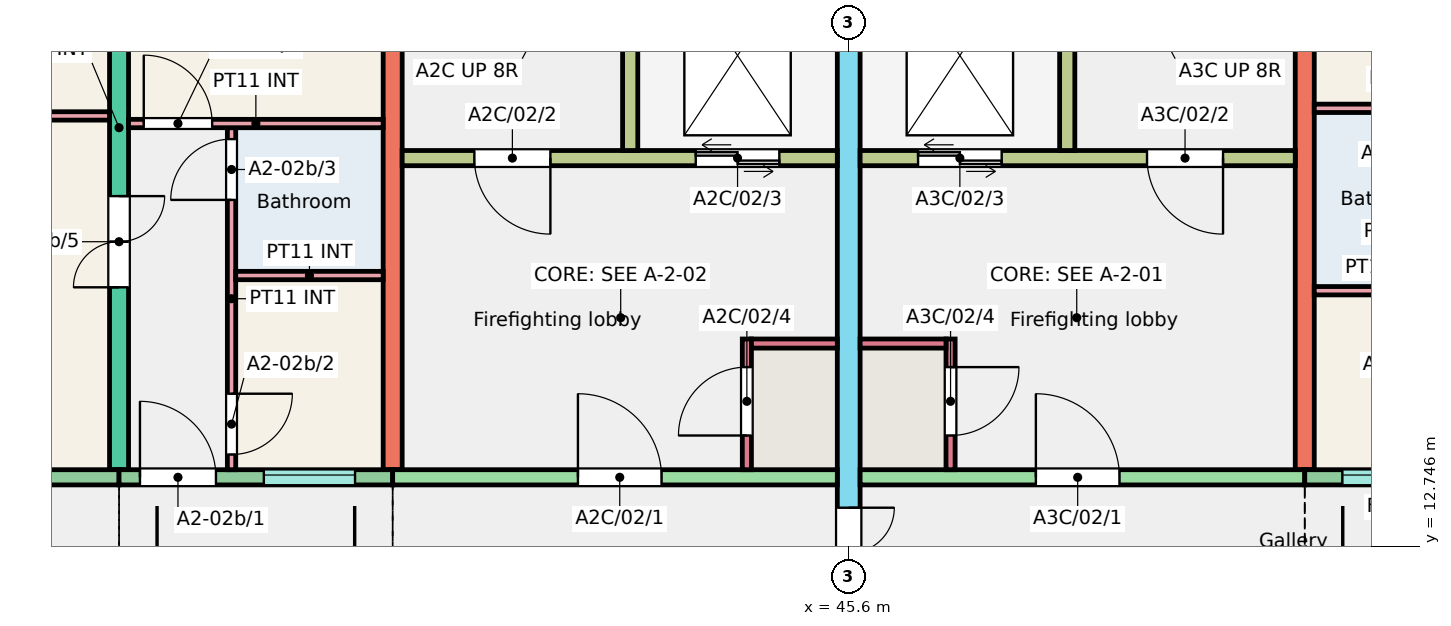
"""IFC4 building model, lengths in metres.
Left out: names, types, materials, properties, quantities, classifications, styles, units other than length and angle.
Written with IfcOpenShell. Run it as: python <this file> out.ifc"""

import sys

from ifc_helpers import new_model, si_unit, direction, frame, frame_2d, origin, place, context, subcontext, project, spatial, rectangle, extrude, element, fill, save


model = new_model("IFC4")
c1 = context("Model", 3, precision=1e-05, world=origin(), true_north=direction((0.0, 1.0)))
c2 = subcontext(c1, "Body", "Model", "MODEL_VIEW")
j1 = project(units=[si_unit("LENGTHUNIT", "METRE"), si_unit("PLANEANGLEUNIT", "RADIAN")], contexts=[c1])
p1 = place(None, origin())
s1 = spatial("IfcSite", under=j1, at=p1, CompositionType="ELEMENT")
p2 = place(p1, origin())
s2 = spatial("IfcBuilding", under=s1, at=p2, CompositionType="ELEMENT")
p3 = place(p2, frame((0.0, 0.0, 6.0)))
s3 = spatial("IfcBuildingStorey", under=s2, at=p3, CompositionType="ELEMENT", Elevation=6.0)
p4 = place(p3, frame((36.0, 13.75, 0.0), z_axis=(0.0, 0.0, 1.0), x_axis=(0.0, 1.0, 0.0)))
e1 = element("IfcWall", 1, at=p4, inside=s3, PredefinedType="SHEAR", context=c2, shape_type="SweptSolid", body=[
    extrude(rectangle(XDim=9.0, YDim=0.25, at=frame_2d((4.5, 0.0))), origin(), (0.0, 0.0, 1.0), 3.0),
])
p5 = place(p4, frame((2.4, 0.0, 0.0)))
e2 = element("IfcOpeningElement", 2, at=p5, cuts=e1, PredefinedType="OPENING", context=c2, shape_type="SweptSolid", body=[
    extrude(rectangle(XDim=1.2, YDim=2.1, at=frame_2d((0.6, 1.05))), frame((0.0, 0.135, 0.0), z_axis=(0.0, -1.0, 0.0), x_axis=(1.0, 0.0, 0.0)), (0.0, 0.0, 1.0), 0.27),
])
p6 = place(p4, frame((6.4, 0.0, 0.0)))
e3 = element("IfcOpeningElement", 3, at=p6, cuts=e1, PredefinedType="OPENING", context=c2, shape_type="SweptSolid", body=[
    extrude(rectangle(XDim=1.2, YDim=2.1, at=frame_2d((0.6, 1.05))), frame((0.0, 0.135, 0.0), z_axis=(0.0, -1.0, 0.0), x_axis=(1.0, 0.0, 0.0)), (0.0, 0.0, 1.0), 0.27),
])
p7 = place(p3, frame((39.6, 13.75, 0.0), z_axis=(0.0, 0.0, 1.0), x_axis=(0.0, 1.0, 0.0)))
e4 = element("IfcWall", 4, at=p7, inside=s3, PredefinedType="SHEAR", context=c2, shape_type="SweptSolid", body=[
    extrude(rectangle(XDim=9.0, YDim=0.25, at=frame_2d((4.5, 0.0))), origin(), (0.0, 0.0, 1.0), 3.0),
])
p8 = place(p3, frame((45.6, 11.75, 0.0), z_axis=(0.0, 0.0, 1.0), x_axis=(0.0, 1.0, 0.0)))
e5 = element("IfcWall", 5, at=p8, inside=s3, PredefinedType="SHEAR", context=c2, shape_type="SweptSolid", body=[
    extrude(rectangle(XDim=11.0, YDim=0.3, at=frame_2d((5.5, 0.0))), origin(), (0.0, 0.0, 1.0), 3.0),
])
p9 = place(p8, frame((0.3, 0.0, 0.0)))
e6 = element("IfcOpeningElement", 6, at=p9, cuts=e5, PredefinedType="OPENING", context=c2, shape_type="SweptSolid", body=[
    extrude(rectangle(XDim=1.2, YDim=2.1, at=frame_2d((0.6, 1.05))), frame((0.0, 0.16, 0.0), z_axis=(0.0, -1.0, 0.0), x_axis=(1.0, 0.0, 0.0)), (0.0, 0.0, 1.0), 0.32),
])
p10 = place(p3, frame((51.6, 13.75, 0.0), z_axis=(0.0, 0.0, 1.0), x_axis=(0.0, 1.0, 0.0)))
e7 = element("IfcWall", 7, at=p10, inside=s3, PredefinedType="SHEAR", context=c2, shape_type="SweptSolid", body=[
    extrude(rectangle(XDim=9.0, YDim=0.25, at=frame_2d((4.5, 0.0))), origin(), (0.0, 0.0, 1.0), 3.0),
])
p11 = place(p3, frame((32.4, 13.65, 0.0), z_axis=(0.0, 0.0, 1.0), x_axis=(1.0, 0.0, 0.0)))
e8 = element("IfcWall", 8, at=p11, inside=s3, PredefinedType="SOLIDWALL", context=c2, shape_type="SweptSolid", body=[
    extrude(rectangle(XDim=3.6, YDim=0.2, at=frame_2d((1.8, 0.0))), origin(), (0.0, 0.0, 1.0), 3.0),
])
p12 = place(p11, frame((1.2, 0.0, 0.8)))
e9 = element("IfcOpeningElement", 9, at=p12, cuts=e8, PredefinedType="OPENING", context=c2, shape_type="SweptSolid", body=[
    extrude(rectangle(XDim=1.2, YDim=1.6, at=frame_2d((0.6, 0.8))), frame((0.0, 0.11, 0.0), z_axis=(0.0, -1.0, 0.0), x_axis=(1.0, 0.0, 0.0)), (0.0, 0.0, 1.0), 0.22),
])
p13 = place(p3, frame((36.0, 13.65, 0.0), z_axis=(0.0, 0.0, 1.0), x_axis=(1.0, 0.0, 0.0)))
e10 = element("IfcWall", 10, at=p13, inside=s3, PredefinedType="SOLIDWALL", context=c2, shape_type="SweptSolid", body=[
    extrude(rectangle(XDim=3.6, YDim=0.2, at=frame_2d((1.8, 0.0))), origin(), (0.0, 0.0, 1.0), 3.0),
])
p14 = place(p13, frame((1.905, 0.0, 1.1)))
e11 = element("IfcOpeningElement", 11, at=p14, cuts=e10, PredefinedType="OPENING", context=c2, shape_type="SweptSolid", body=[
    extrude(rectangle(XDim=1.2, YDim=1.3, at=frame_2d((0.6, 0.65))), frame((0.0, 0.11, 0.0), z_axis=(0.0, -1.0, 0.0), x_axis=(1.0, 0.0, 0.0)), (0.0, 0.0, 1.0), 0.22),
])
p15 = place(p13, frame((0.275, 0.0, 0.0)))
e12 = element("IfcOpeningElement", 12, at=p15, cuts=e10, PredefinedType="OPENING", context=c2, shape_type="SweptSolid", body=[
    extrude(rectangle(XDim=1.0, YDim=2.1, at=frame_2d((0.5, 1.05))), frame((0.0, 0.11, 0.0), z_axis=(0.0, -1.0, 0.0), x_axis=(1.0, 0.0, 0.0)), (0.0, 0.0, 1.0), 0.22),
])
p16 = place(p3, frame((39.6, 13.65, 0.0), z_axis=(0.0, 0.0, 1.0), x_axis=(1.0, 0.0, 0.0)))
e13 = element("IfcWall", 13, at=p16, inside=s3, PredefinedType="SHEAR", context=c2, shape_type="SweptSolid", body=[
    extrude(rectangle(XDim=5.85, YDim=0.2, at=frame_2d((2.925, 0.0))), origin(), (0.0, 0.0, 1.0), 3.0),
])
p17 = place(p16, frame((2.438, 0.0, 0.0)))
e14 = element("IfcOpeningElement", 14, at=p17, cuts=e13, PredefinedType="OPENING", context=c2, shape_type="SweptSolid", body=[
    extrude(rectangle(XDim=1.1, YDim=2.1, at=frame_2d((0.55, 1.05))), frame((0.0, 0.11, 0.0), z_axis=(0.0, -1.0, 0.0), x_axis=(1.0, 0.0, 0.0)), (0.0, 0.0, 1.0), 0.22),
])
p18 = place(p3, frame((39.725, 17.85, 0.0), z_axis=(0.0, 0.0, 1.0), x_axis=(1.0, 0.0, 0.0)))
e15 = element("IfcWall", 15, at=p18, inside=s3, PredefinedType="SHEAR", context=c2, shape_type="SweptSolid", body=[
    extrude(rectangle(XDim=5.725, YDim=0.2, at=frame_2d((2.862, 0.0))), origin(), (0.0, 0.0, 1.0), 3.0),
])
p19 = place(p18, frame((0.95, 0.0, 0.0)))
e16 = element("IfcOpeningElement", 16, at=p19, cuts=e15, PredefinedType="OPENING", context=c2, shape_type="SweptSolid", body=[
    extrude(rectangle(XDim=1.0, YDim=2.1, at=frame_2d((0.5, 1.05))), frame((0.0, 0.11, 0.0), z_axis=(0.0, -1.0, 0.0), x_axis=(1.0, 0.0, 0.0)), (0.0, 0.0, 1.0), 0.22),
])
p20 = place(p18, frame((3.863, 0.0, 0.0)))
e17 = element("IfcOpeningElement", 17, at=p20, cuts=e15, PredefinedType="OPENING", context=c2, shape_type="SweptSolid", body=[
    extrude(rectangle(XDim=1.1, YDim=2.1, at=frame_2d((0.55, 1.05))), frame((0.0, 0.11, 0.0), z_axis=(0.0, -1.0, 0.0), x_axis=(1.0, 0.0, 0.0)), (0.0, 0.0, 1.0), 0.22),
])
p21 = place(p3, frame((42.725, 17.95, 0.0), z_axis=(0.0, 0.0, 1.0), x_axis=(0.0, 1.0, 0.0)))
e18 = element("IfcWall", 18, at=p21, inside=s3, PredefinedType="SHEAR", context=c2, shape_type="SweptSolid", body=[
    extrude(rectangle(XDim=4.8, YDim=0.2, at=frame_2d((2.4, 0.0))), origin(), (0.0, 0.0, 1.0), 3.0),
])
p22 = place(p3, frame((44.26, 13.75, 0.0), z_axis=(0.0, 0.0, 1.0), x_axis=(0.0, 1.0, 0.0)))
e19 = element("IfcWall", 19, at=p22, inside=s3, PredefinedType="SHEAR", context=c2, shape_type="SweptSolid", body=[
    extrude(rectangle(XDim=1.72, YDim=0.12, at=frame_2d((0.86, 0.0))), origin(), (0.0, 0.0, 1.0), 3.0),
])
p23 = place(p22, frame((0.45, 0.0, 0.0)))
e20 = element("IfcOpeningElement", 20, at=p23, cuts=e19, PredefinedType="OPENING", context=c2, shape_type="SweptSolid", body=[
    extrude(rectangle(XDim=0.9, YDim=2.1, at=frame_2d((0.45, 1.05))), frame((0.0, 0.07, 0.0), z_axis=(0.0, -1.0, 0.0), x_axis=(1.0, 0.0, 0.0)), (0.0, 0.0, 1.0), 0.14),
])
p24 = place(p3, frame((44.32, 15.41, 0.0), z_axis=(0.0, 0.0, 1.0), x_axis=(1.0, 0.0, 0.0)))
e21 = element("IfcWall", 21, at=p24, inside=s3, PredefinedType="SHEAR", context=c2, shape_type="SweptSolid", body=[
    extrude(rectangle(XDim=1.13, YDim=0.12, at=frame_2d((0.565, 0.0))), origin(), (0.0, 0.0, 1.0), 3.0),
])
p25 = place(p3, frame((45.75, 13.65, 0.0), z_axis=(0.0, 0.0, 1.0), x_axis=(1.0, 0.0, 0.0)))
e22 = element("IfcWall", 22, at=p25, inside=s3, PredefinedType="SHEAR", context=c2, shape_type="SweptSolid", body=[
    extrude(rectangle(XDim=5.85, YDim=0.2, at=frame_2d((2.925, 0.0))), origin(), (0.0, 0.0, 1.0), 3.0),
])
p26 = place(p25, frame((2.312, 0.0, 0.0)))
e23 = element("IfcOpeningElement", 23, at=p26, cuts=e22, PredefinedType="OPENING", context=c2, shape_type="SweptSolid", body=[
    extrude(rectangle(XDim=1.1, YDim=2.1, at=frame_2d((0.55, 1.05))), frame((0.0, 0.11, 0.0), z_axis=(0.0, -1.0, 0.0), x_axis=(1.0, 0.0, 0.0)), (0.0, 0.0, 1.0), 0.22),
])
p27 = place(p3, frame((45.75, 17.85, 0.0), z_axis=(0.0, 0.0, 1.0), x_axis=(1.0, 0.0, 0.0)))
e24 = element("IfcWall", 24, at=p27, inside=s3, PredefinedType="SHEAR", context=c2, shape_type="SweptSolid", body=[
    extrude(rectangle(XDim=5.725, YDim=0.2, at=frame_2d((2.863, 0.0))), origin(), (0.0, 0.0, 1.0), 3.0),
])
p28 = place(p27, frame((3.775, 0.0, 0.0)))
e25 = element("IfcOpeningElement", 25, at=p28, cuts=e24, PredefinedType="OPENING", context=c2, shape_type="SweptSolid", body=[
    extrude(rectangle(XDim=1.0, YDim=2.1, at=frame_2d((0.5, 1.05))), frame((0.0, 0.11, 0.0), z_axis=(0.0, -1.0, 0.0), x_axis=(1.0, 0.0, 0.0)), (0.0, 0.0, 1.0), 0.22),
])
p29 = place(p27, frame((0.762, 0.0, 0.0)))
e26 = element("IfcOpeningElement", 26, at=p29, cuts=e24, PredefinedType="OPENING", context=c2, shape_type="SweptSolid", body=[
    extrude(rectangle(XDim=1.1, YDim=2.1, at=frame_2d((0.55, 1.05))), frame((0.0, 0.11, 0.0), z_axis=(0.0, -1.0, 0.0), x_axis=(1.0, 0.0, 0.0)), (0.0, 0.0, 1.0), 0.22),
])
p30 = place(p3, frame((48.475, 17.95, 0.0), z_axis=(0.0, 0.0, 1.0), x_axis=(0.0, 1.0, 0.0)))
e27 = element("IfcWall", 27, at=p30, inside=s3, PredefinedType="SHEAR", context=c2, shape_type="SweptSolid", body=[
    extrude(rectangle(XDim=4.8, YDim=0.2, at=frame_2d((2.4, 0.0))), origin(), (0.0, 0.0, 1.0), 3.0),
])
p31 = place(p3, frame((46.94, 13.75, 0.0), z_axis=(0.0, 0.0, 1.0), x_axis=(0.0, 1.0, 0.0)))
e28 = element("IfcWall", 28, at=p31, inside=s3, PredefinedType="SHEAR", context=c2, shape_type="SweptSolid", body=[
    extrude(rectangle(XDim=1.72, YDim=0.12, at=frame_2d((0.86, 0.0))), origin(), (0.0, 0.0, 1.0), 3.0),
])
p32 = place(p31, frame((0.45, 0.0, 0.0)))
e29 = element("IfcOpeningElement", 29, at=p32, cuts=e28, PredefinedType="OPENING", context=c2, shape_type="SweptSolid", body=[
    extrude(rectangle(XDim=0.9, YDim=2.1, at=frame_2d((0.45, 1.05))), frame((0.0, 0.07, 0.0), z_axis=(0.0, -1.0, 0.0), x_axis=(1.0, 0.0, 0.0)), (0.0, 0.0, 1.0), 0.14),
])
p33 = place(p3, frame((45.75, 15.41, 0.0), z_axis=(0.0, 0.0, 1.0), x_axis=(1.0, 0.0, 0.0)))
e30 = element("IfcWall", 30, at=p33, inside=s3, PredefinedType="SHEAR", context=c2, shape_type="SweptSolid", body=[
    extrude(rectangle(XDim=1.13, YDim=0.12, at=frame_2d((0.565, 0.0))), origin(), (0.0, 0.0, 1.0), 3.0),
])
p34 = place(p3, frame((51.6, 13.65, 0.0), z_axis=(0.0, 0.0, 1.0), x_axis=(1.0, 0.0, 0.0)))
e31 = element("IfcWall", 31, at=p34, inside=s3, PredefinedType="SOLIDWALL", context=c2, shape_type="SweptSolid", body=[
    extrude(rectangle(XDim=3.6, YDim=0.2, at=frame_2d((1.8, 0.0))), origin(), (0.0, 0.0, 1.0), 3.0),
])
p35 = place(p34, frame((0.495, 0.0, 1.1)))
e32 = element("IfcOpeningElement", 32, at=p35, cuts=e31, PredefinedType="OPENING", context=c2, shape_type="SweptSolid", body=[
    extrude(rectangle(XDim=1.2, YDim=1.3, at=frame_2d((0.6, 0.65))), frame((0.0, 0.11, 0.0), z_axis=(0.0, -1.0, 0.0), x_axis=(1.0, 0.0, 0.0)), (0.0, 0.0, 1.0), 0.22),
])
p36 = place(p34, frame((2.325, 0.0, 0.0)))
e33 = element("IfcOpeningElement", 33, at=p36, cuts=e31, PredefinedType="OPENING", context=c2, shape_type="SweptSolid", body=[
    extrude(rectangle(XDim=1.0, YDim=2.1, at=frame_2d((0.5, 1.05))), frame((0.0, 0.11, 0.0), z_axis=(0.0, -1.0, 0.0), x_axis=(1.0, 0.0, 0.0)), (0.0, 0.0, 1.0), 0.22),
])
p37 = place(p3, frame((37.48, 13.75, 0.0), z_axis=(0.0, 0.0, 1.0), x_axis=(0.0, 1.0, 0.0)))
e34 = element("IfcWall", 34, at=p37, inside=s3, PredefinedType="PARTITIONING", context=c2, shape_type="SweptSolid", body=[
    extrude(rectangle(XDim=4.5, YDim=0.11, at=frame_2d((2.25, 0.0))), origin(), (0.0, 0.0, 1.0), 2.8),
])
p38 = place(p37, frame((0.2, 0.0, 0.0)))
e35 = element("IfcOpeningElement", 35, at=p38, cuts=e34, PredefinedType="OPENING", context=c2, shape_type="SweptSolid", body=[
    extrude(rectangle(XDim=0.8, YDim=2.1, at=frame_2d((0.4, 1.05))), frame((0.0, 0.065, 0.0), z_axis=(0.0, -1.0, 0.0), x_axis=(1.0, 0.0, 0.0)), (0.0, 0.0, 1.0), 0.13),
])
p39 = place(p37, frame((3.55, 0.0, 0.0)))
e36 = element("IfcOpeningElement", 36, at=p39, cuts=e34, PredefinedType="OPENING", context=c2, shape_type="SweptSolid", body=[
    extrude(rectangle(XDim=0.8, YDim=2.1, at=frame_2d((0.4, 1.05))), frame((0.0, 0.065, 0.0), z_axis=(0.0, -1.0, 0.0), x_axis=(1.0, 0.0, 0.0)), (0.0, 0.0, 1.0), 0.13),
])
p40 = place(p3, frame((37.535, 16.305, 0.0), z_axis=(0.0, 0.0, 1.0), x_axis=(1.0, 0.0, 0.0)))
e37 = element("IfcWall", 37, at=p40, inside=s3, PredefinedType="PARTITIONING", context=c2, shape_type="SweptSolid", body=[
    extrude(rectangle(XDim=1.94, YDim=0.11, at=frame_2d((0.97, 0.0))), origin(), (0.0, 0.0, 1.0), 2.8),
])
p41 = place(p3, frame((36.125, 18.305, 0.0), z_axis=(0.0, 0.0, 1.0), x_axis=(1.0, 0.0, 0.0)))
e38 = element("IfcWall", 38, at=p41, inside=s3, PredefinedType="PARTITIONING", context=c2, shape_type="SweptSolid", body=[
    extrude(rectangle(XDim=3.35, YDim=0.11, at=frame_2d((1.675, 0.0))), origin(), (0.0, 0.0, 1.0), 2.8),
])
p42 = place(p41, frame((0.2, 0.0, 0.0)))
e39 = element("IfcOpeningElement", 39, at=p42, cuts=e38, PredefinedType="OPENING", context=c2, shape_type="SweptSolid", body=[
    extrude(rectangle(XDim=0.9, YDim=2.1, at=frame_2d((0.45, 1.05))), frame((0.0, 0.065, 0.0), z_axis=(0.0, -1.0, 0.0), x_axis=(1.0, 0.0, 0.0)), (0.0, 0.0, 1.0), 0.13),
])
p43 = place(p3, frame((32.525, 18.405, 0.0), z_axis=(0.0, 0.0, 1.0), x_axis=(1.0, 0.0, 0.0)))
e40 = element("IfcWall", 40, at=p43, inside=s3, PredefinedType="PARTITIONING", context=c2, shape_type="SweptSolid", body=[
    extrude(rectangle(XDim=3.35, YDim=0.11, at=frame_2d((1.675, 0.0))), origin(), (0.0, 0.0, 1.0), 2.8),
])
p44 = place(p3, frame((51.725, 16.105, 0.0), z_axis=(0.0, 0.0, 1.0), x_axis=(1.0, 0.0, 0.0)))
e41 = element("IfcWall", 41, at=p44, inside=s3, PredefinedType="PARTITIONING", context=c2, shape_type="SweptSolid", body=[
    extrude(rectangle(XDim=1.94, YDim=0.11, at=frame_2d((0.97, 0.0))), origin(), (0.0, 0.0, 1.0), 2.8),
])
p45 = place(p3, frame((51.725, 18.505, 0.0), z_axis=(0.0, 0.0, 1.0), x_axis=(1.0, 0.0, 0.0)))
e42 = element("IfcWall", 42, at=p45, inside=s3, PredefinedType="PARTITIONING", context=c2, shape_type="SweptSolid", body=[
    extrude(rectangle(XDim=3.35, YDim=0.11, at=frame_2d((1.675, 0.0))), origin(), (0.0, 0.0, 1.0), 2.8),
])
p46 = place(p45, frame((2.25, 0.0, 0.0)))
e43 = element("IfcOpeningElement", 43, at=p46, cuts=e42, PredefinedType="OPENING", context=c2, shape_type="SweptSolid", body=[
    extrude(rectangle(XDim=0.9, YDim=2.1, at=frame_2d((0.45, 1.05))), frame((0.0, 0.065, 0.0), z_axis=(0.0, -1.0, 0.0), x_axis=(1.0, 0.0, 0.0)), (0.0, 0.0, 1.0), 0.13),
])
p47 = place(p14, origin())
e44 = element("IfcWindow", 44, at=p47, inside=s3, PartitioningType="SINGLE_PANEL", PredefinedType="WINDOW", context=c2, shape_type="SweptSolid", body=[
    extrude(rectangle(XDim=1.2, YDim=1.3, at=frame_2d((0.6, 0.65))), frame((0.0, 0.06, 0.0), z_axis=(0.0, -1.0, 0.0), x_axis=(1.0, 0.0, 0.0)), (0.0, 0.0, 1.0), 0.06),
])
fill(e11, e44)
p48 = place(p35, origin())
e45 = element("IfcWindow", 45, at=p48, inside=s3, PartitioningType="SINGLE_PANEL", PredefinedType="WINDOW", context=c2, shape_type="SweptSolid", body=[
    extrude(rectangle(XDim=1.2, YDim=1.3, at=frame_2d((0.6, 0.65))), frame((0.0, 0.06, 0.0), z_axis=(0.0, -1.0, 0.0), x_axis=(1.0, 0.0, 0.0)), (0.0, 0.0, 1.0), 0.06),
])
fill(e32, e45)
p49 = place(p15, origin())
e46 = element("IfcDoor", 46, at=p49, inside=s3, OperationType="SINGLE_SWING_LEFT", PredefinedType="DOOR", context=c2, shape_type="SweptSolid", body=[
    extrude(rectangle(XDim=1.0, YDim=2.1, at=frame_2d((0.5, 1.05))), frame((0.0, 0.025, 0.0), z_axis=(0.0, -1.0, 0.0), x_axis=(1.0, 0.0, 0.0)), (0.0, 0.0, 1.0), 0.05),
])
fill(e12, e46)
p50 = place(p38, origin())
e47 = element("IfcDoor", 47, at=p50, inside=s3, OperationType="SINGLE_SWING_RIGHT", PredefinedType="DOOR", context=c2, shape_type="SweptSolid", body=[
    extrude(rectangle(XDim=0.8, YDim=2.1, at=frame_2d((0.4, 1.05))), frame((0.0, 0.025, 0.0), z_axis=(0.0, -1.0, 0.0), x_axis=(1.0, 0.0, 0.0)), (0.0, 0.0, 1.0), 0.05),
])
fill(e35, e47)
p51 = place(p39, origin())
e48 = element("IfcDoor", 48, at=p51, inside=s3, OperationType="SINGLE_SWING_LEFT", PredefinedType="DOOR", context=c2, shape_type="SweptSolid", body=[
    extrude(rectangle(XDim=0.8, YDim=2.1, at=frame_2d((0.4, 1.05))), frame((0.0, 0.025, 0.0), z_axis=(0.0, -1.0, 0.0), x_axis=(1.0, 0.0, 0.0)), (0.0, 0.0, 1.0), 0.05),
])
fill(e36, e48)
p52 = place(p42, origin())
e49 = element("IfcDoor", 49, at=p52, inside=s3, OperationType="SINGLE_SWING_LEFT", PredefinedType="DOOR", context=c2, shape_type="SweptSolid", body=[
    extrude(rectangle(XDim=0.9, YDim=2.1, at=frame_2d((0.45, 1.05))), frame((0.0, 0.025, 0.0), z_axis=(0.0, -1.0, 0.0), x_axis=(1.0, 0.0, 0.0)), (0.0, 0.0, 1.0), 0.05),
])
fill(e39, e49)
p53 = place(p5, origin())
e50 = element("IfcDoor", 50, at=p53, inside=s3, OperationType="DOUBLE_DOOR_SINGLE_SWING", PredefinedType="DOOR", context=c2, shape_type="SweptSolid", body=[
    extrude(rectangle(XDim=1.2, YDim=2.1, at=frame_2d((0.6, 1.05))), frame((0.0, 0.025, 0.0), z_axis=(0.0, -1.0, 0.0), x_axis=(1.0, 0.0, 0.0)), (0.0, 0.0, 1.0), 0.05),
])
fill(e2, e50)
p54 = place(p17, origin())
e51 = element("IfcDoor", 51, at=p54, inside=s3, OperationType="SINGLE_SWING_LEFT", PredefinedType="DOOR", context=c2, shape_type="SweptSolid", body=[
    extrude(rectangle(XDim=1.1, YDim=2.1, at=frame_2d((0.55, 1.05))), frame((0.0, 0.025, 0.0), z_axis=(0.0, -1.0, 0.0), x_axis=(1.0, 0.0, 0.0)), (0.0, 0.0, 1.0), 0.05),
])
fill(e14, e51)
p55 = place(p19, origin())
e52 = element("IfcDoor", 52, at=p55, inside=s3, OperationType="SINGLE_SWING_RIGHT", PredefinedType="DOOR", context=c2, shape_type="SweptSolid", body=[
    extrude(rectangle(XDim=1.0, YDim=2.1, at=frame_2d((0.5, 1.05))), frame((0.0, 0.025, 0.0), z_axis=(0.0, -1.0, 0.0), x_axis=(1.0, 0.0, 0.0)), (0.0, 0.0, 1.0), 0.05),
])
fill(e16, e52)
p56 = place(p20, origin())
e53 = element("IfcDoor", 53, at=p56, inside=s3, OperationType="DOUBLE_DOOR_SLIDING", PredefinedType="DOOR", context=c2, shape_type="SweptSolid", body=[
    extrude(rectangle(XDim=1.1, YDim=2.1, at=frame_2d((0.55, 1.05))), frame((0.0, 0.025, 0.0), z_axis=(0.0, -1.0, 0.0), x_axis=(1.0, 0.0, 0.0)), (0.0, 0.0, 1.0), 0.05),
])
fill(e17, e53)
p57 = place(p23, origin())
e54 = element("IfcDoor", 54, at=p57, inside=s3, OperationType="SINGLE_SWING_LEFT", PredefinedType="DOOR", context=c2, shape_type="SweptSolid", body=[
    extrude(rectangle(XDim=0.9, YDim=2.1, at=frame_2d((0.45, 1.05))), frame((0.0, 0.025, 0.0), z_axis=(0.0, -1.0, 0.0), x_axis=(1.0, 0.0, 0.0)), (0.0, 0.0, 1.0), 0.05),
])
fill(e20, e54)
p58 = place(p26, origin())
e55 = element("IfcDoor", 55, at=p58, inside=s3, OperationType="SINGLE_SWING_LEFT", PredefinedType="DOOR", context=c2, shape_type="SweptSolid", body=[
    extrude(rectangle(XDim=1.1, YDim=2.1, at=frame_2d((0.55, 1.05))), frame((0.0, 0.025, 0.0), z_axis=(0.0, -1.0, 0.0), x_axis=(1.0, 0.0, 0.0)), (0.0, 0.0, 1.0), 0.05),
])
fill(e23, e55)
p59 = place(p28, origin())
e56 = element("IfcDoor", 56, at=p59, inside=s3, OperationType="SINGLE_SWING_RIGHT", PredefinedType="DOOR", context=c2, shape_type="SweptSolid", body=[
    extrude(rectangle(XDim=1.0, YDim=2.1, at=frame_2d((0.5, 1.05))), frame((0.0, 0.025, 0.0), z_axis=(0.0, -1.0, 0.0), x_axis=(1.0, 0.0, 0.0)), (0.0, 0.0, 1.0), 0.05),
])
fill(e25, e56)
p60 = place(p29, origin())
e57 = element("IfcDoor", 57, at=p60, inside=s3, OperationType="DOUBLE_DOOR_SLIDING", PredefinedType="DOOR", context=c2, shape_type="SweptSolid", body=[
    extrude(rectangle(XDim=1.1, YDim=2.1, at=frame_2d((0.55, 1.05))), frame((0.0, 0.025, 0.0), z_axis=(0.0, -1.0, 0.0), x_axis=(1.0, 0.0, 0.0)), (0.0, 0.0, 1.0), 0.05),
])
fill(e26, e57)
p61 = place(p32, origin())
e58 = element("IfcDoor", 58, at=p61, inside=s3, OperationType="SINGLE_SWING_RIGHT", PredefinedType="DOOR", context=c2, shape_type="SweptSolid", body=[
    extrude(rectangle(XDim=0.9, YDim=2.1, at=frame_2d((0.45, 1.05))), frame((0.0, 0.025, 0.0), z_axis=(0.0, -1.0, 0.0), x_axis=(1.0, 0.0, 0.0)), (0.0, 0.0, 1.0), 0.05),
])
fill(e29, e58)
p62 = place(p9, origin())
e59 = element("IfcDoor", 59, at=p62, inside=s3, OperationType="DOUBLE_DOOR_SINGLE_SWING", PredefinedType="DOOR", context=c2, shape_type="SweptSolid", body=[
    extrude(rectangle(XDim=1.2, YDim=2.1, at=frame_2d((0.6, 1.05))), frame((0.0, 0.025, 0.0), z_axis=(0.0, -1.0, 0.0), x_axis=(1.0, 0.0, 0.0)), (0.0, 0.0, 1.0), 0.05),
])
fill(e6, e59)
save(model, sys.argv[1])
